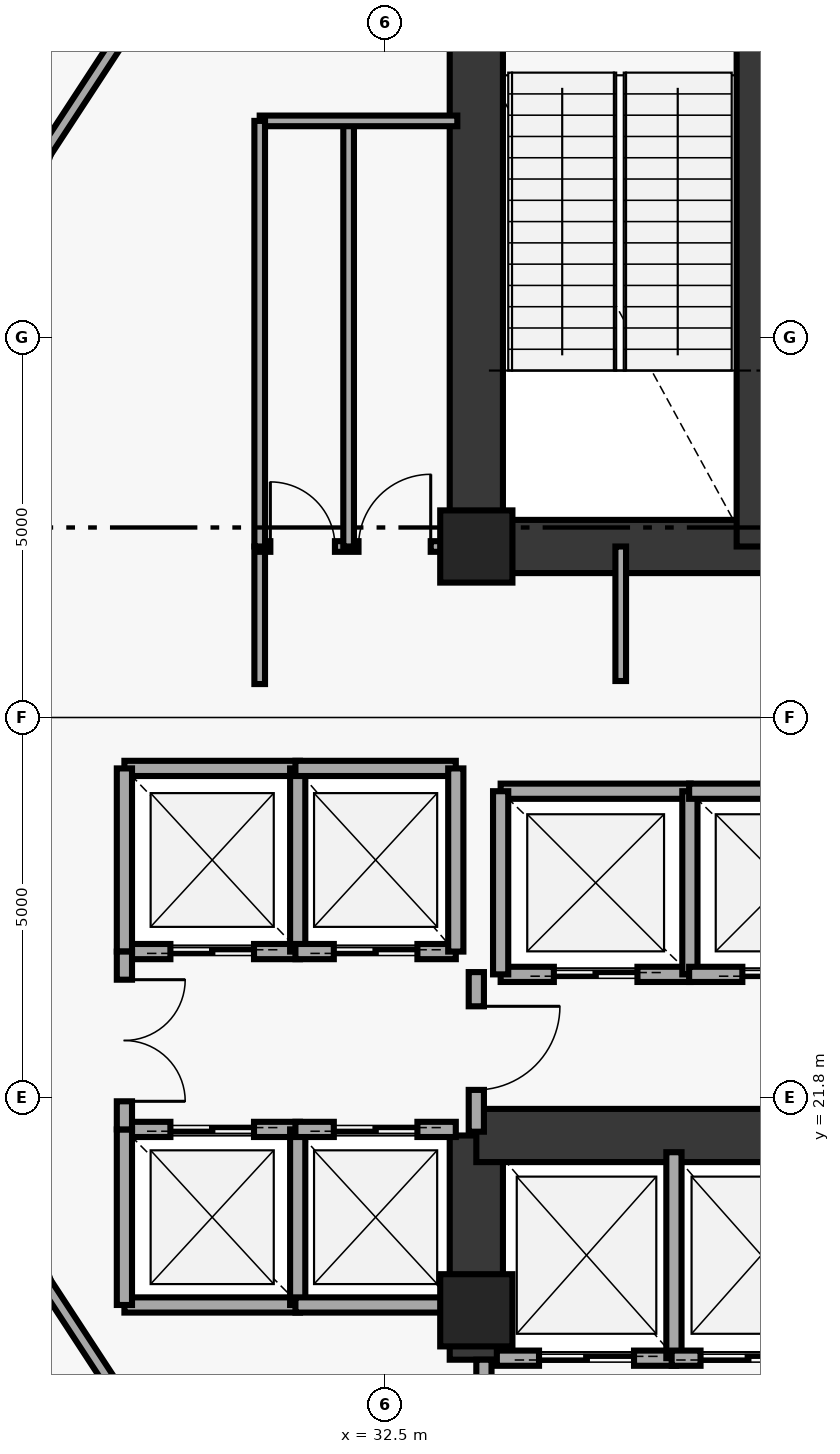
"""IFC4 building model, lengths in metres.
Left out: names, types, materials, properties, quantities, classifications, styles, units other than length and angle.
Written with IfcOpenShell. Run it as: python <this file> out.ifc"""

import sys

from ifc_helpers import new_model, si_unit, direction, frame, frame_2d, origin, origin_2d, place, context, subcontext, project, spatial, rectangle, extrude, element, fill, save


model = new_model("IFC4")
c1 = context("Model", 3, precision=1e-05, world=origin(), true_north=direction((0.0, 1.0)))
c2 = subcontext(c1, "Body", "Model", "MODEL_VIEW")
j1 = project(units=[si_unit("LENGTHUNIT", "METRE"), si_unit("PLANEANGLEUNIT", "RADIAN")], contexts=[c1])
p1 = place(None, origin())
s1 = spatial("IfcSite", under=j1, at=p1, CompositionType="ELEMENT")
p2 = place(p1, origin())
s2 = spatial("IfcBuilding", under=s1, at=p2, CompositionType="ELEMENT")
p3 = place(p2, frame((0.0, 0.0, 113.25)))
s3 = spatial("IfcBuildingStorey", under=s2, at=p3, CompositionType="ELEMENT", Elevation=113.25)
for number, where, z_axis, x_axis in (
    (1, (33.7, 19.0, 0.0), (0.0, 0.0, 1.0), (1.0, 0.0, 0.0)),
    (2, (33.7, 29.05, 0.0), (0.0, 0.0, 1.0), (1.0, 0.0, 0.0)),
):
    element("IfcColumn", number, at=place(p3, frame(where, z_axis=z_axis, x_axis=x_axis)), inside=s3, PredefinedType="PILASTER", context=c2, shape_type="SweptSolid", body=[
        extrude(rectangle(XDim=0.95, YDim=0.95, at=origin_2d()), origin(), (0.0, 0.0, 1.0), 4.75),
    ])
p4 = place(p3, frame((33.7, 29.05, 0.0), z_axis=(0.0, 0.0, 1.0), x_axis=(0.0, 1.0, 0.0)))
e3 = element("IfcWall", 3, at=p4, inside=s3, PredefinedType="SHEAR", context=c2, shape_type="SweptSolid", body=[
    extrude(rectangle(XDim=8.35, YDim=0.7, at=frame_2d((4.175, 0.0))), origin(), (0.0, 0.0, 1.0), 4.75),
])
p5 = place(p3, frame((33.7, 18.35, 0.0), z_axis=(0.0, 0.0, 1.0), x_axis=(0.0, 1.0, 0.0)))
e4 = element("IfcWall", 4, at=p5, inside=s3, PredefinedType="SHEAR", context=c2, shape_type="SweptSolid", body=[
    extrude(rectangle(XDim=2.95, YDim=0.7, at=frame_2d((1.475, 0.0))), origin(), (0.0, 0.0, 1.0), 4.75),
])
p6 = place(p3, frame((33.7, 29.05, 0.0), z_axis=(0.0, 0.0, 1.0), x_axis=(1.0, 0.0, 0.0)))
e5 = element("IfcWall", 5, at=p6, inside=s3, PredefinedType="SHEAR", context=c2, shape_type="SweptSolid", body=[
    extrude(rectangle(XDim=10.6, YDim=0.7, at=frame_2d((5.3, 0.0))), origin(), (0.0, 0.0, 1.0), 4.75),
])
p7 = place(p3, frame((33.7, 21.3, 0.0), z_axis=(0.0, 0.0, 1.0), x_axis=(1.0, 0.0, 0.0)))
e6 = element("IfcWall", 6, at=p7, inside=s3, PredefinedType="SHEAR", context=c2, shape_type="SweptSolid", body=[
    extrude(rectangle(XDim=7.55, YDim=0.7, at=frame_2d((3.775, 0.0))), origin(), (0.0, 0.0, 1.0), 4.75),
])
p8 = place(p3, frame((37.35, 29.05, 0.0), z_axis=(0.0, 0.0, 1.0), x_axis=(0.0, 1.0, 0.0)))
e7 = element("IfcWall", 7, at=p8, inside=s3, PredefinedType="SHEAR", context=c2, shape_type="SweptSolid", body=[
    extrude(rectangle(XDim=8.35, YDim=0.45, at=frame_2d((4.175, 0.0))), origin(), (0.0, 0.0, 1.0), 4.75),
])
p9 = place(p3, frame((35.6, 27.28, 0.0), z_axis=(0.0, 0.0, 1.0), x_axis=(0.0, 1.0, 0.0)))
e8 = element("IfcWall", 8, at=p9, inside=s3, PredefinedType="PARTITIONING", context=c2, shape_type="SweptSolid", body=[
    extrude(rectangle(XDim=1.77, YDim=0.14, at=frame_2d((0.885, 0.0))), origin(), (0.0, 0.0, 1.0), 4.75),
])
p10 = place(p3, frame((29.07, 23.72, 0.0), z_axis=(0.0, 0.0, 1.0), x_axis=(1.0, 0.0, 0.0)))
e9 = element("IfcWall", 9, at=p10, inside=s3, PredefinedType="SOLIDWALL", context=c2, shape_type="SweptSolid", body=[
    extrude(rectangle(XDim=2.31, YDim=0.2, at=frame_2d((1.155, 0.0))), origin(), (0.0, 0.0, 1.0), 4.75),
])
p11 = place(p10, frame((0.605, 0.0, 0.0)))
e10 = element("IfcOpeningElement", 10, at=p11, cuts=e9, PredefinedType="OPENING", context=c2, shape_type="SweptSolid", body=[
    extrude(rectangle(XDim=1.1, YDim=2.15, at=frame_2d((0.55, 1.075))), frame((0.0, 0.11, 0.0), z_axis=(0.0, -1.0, 0.0), x_axis=(1.0, 0.0, 0.0)), (0.0, 0.0, 1.0), 0.22),
])
p12 = place(p3, frame((29.07, 26.13, 0.0), z_axis=(0.0, 0.0, 1.0), x_axis=(1.0, 0.0, 0.0)))
e11 = element("IfcWall", 11, at=p12, inside=s3, PredefinedType="SOLIDWALL", context=c2, shape_type="SweptSolid", body=[
    extrude(rectangle(XDim=2.31, YDim=0.2, at=frame_2d((1.155, 0.0))), origin(), (0.0, 0.0, 1.0), 4.75),
])
for number, where, z_axis, x_axis in (
    (12, (29.07, 23.72, 0.0), (0.0, 0.0, 1.0), (0.0, 1.0, 0.0)),
    (13, (31.35, 23.72, 0.0), (0.0, 0.0, 1.0), (0.0, 1.0, 0.0)),
):
    element("IfcWall", number, at=place(p3, frame(where, z_axis=z_axis, x_axis=x_axis)), inside=s3, PredefinedType="SOLIDWALL", context=c2, shape_type="SweptSolid", body=[
        extrude(rectangle(XDim=2.41, YDim=0.2, at=frame_2d((1.205, 0.0))), origin(), (0.0, 0.0, 1.0), 4.75),
    ])
p13 = place(p3, frame((31.32, 23.72, 0.0), z_axis=(0.0, 0.0, 1.0), x_axis=(1.0, 0.0, 0.0)))
e14 = element("IfcWall", 14, at=p13, inside=s3, PredefinedType="SOLIDWALL", context=c2, shape_type="SweptSolid", body=[
    extrude(rectangle(XDim=2.11, YDim=0.2, at=frame_2d((1.055, 0.0))), origin(), (0.0, 0.0, 1.0), 4.75),
])
p14 = place(p13, frame((0.505, 0.0, 0.0)))
e15 = element("IfcOpeningElement", 15, at=p14, cuts=e14, PredefinedType="OPENING", context=c2, shape_type="SweptSolid", body=[
    extrude(rectangle(XDim=1.1, YDim=2.15, at=frame_2d((0.55, 1.075))), frame((0.0, 0.11, 0.0), z_axis=(0.0, -1.0, 0.0), x_axis=(1.0, 0.0, 0.0)), (0.0, 0.0, 1.0), 0.22),
])
p15 = place(p3, frame((31.32, 26.13, 0.0), z_axis=(0.0, 0.0, 1.0), x_axis=(1.0, 0.0, 0.0)))
e16 = element("IfcWall", 16, at=p15, inside=s3, PredefinedType="SOLIDWALL", context=c2, shape_type="SweptSolid", body=[
    extrude(rectangle(XDim=2.11, YDim=0.2, at=frame_2d((1.055, 0.0))), origin(), (0.0, 0.0, 1.0), 4.75),
])
p16 = place(p3, frame((33.43, 23.72, 0.0), z_axis=(0.0, 0.0, 1.0), x_axis=(0.0, 1.0, 0.0)))
e17 = element("IfcWall", 17, at=p16, inside=s3, PredefinedType="SOLIDWALL", context=c2, shape_type="SweptSolid", body=[
    extrude(rectangle(XDim=2.41, YDim=0.2, at=frame_2d((1.205, 0.0))), origin(), (0.0, 0.0, 1.0), 4.75),
])
p17 = place(p3, frame((29.07, 19.07, 0.0), z_axis=(0.0, 0.0, 1.0), x_axis=(1.0, 0.0, 0.0)))
e18 = element("IfcWall", 18, at=p17, inside=s3, PredefinedType="SOLIDWALL", context=c2, shape_type="SweptSolid", body=[
    extrude(rectangle(XDim=2.31, YDim=0.2, at=frame_2d((1.155, 0.0))), origin(), (0.0, 0.0, 1.0), 4.75),
])
p18 = place(p3, frame((29.07, 21.38, 0.0), z_axis=(0.0, 0.0, 1.0), x_axis=(1.0, 0.0, 0.0)))
e19 = element("IfcWall", 19, at=p18, inside=s3, PredefinedType="SOLIDWALL", context=c2, shape_type="SweptSolid", body=[
    extrude(rectangle(XDim=2.31, YDim=0.2, at=frame_2d((1.155, 0.0))), origin(), (0.0, 0.0, 1.0), 4.75),
])
p19 = place(p18, frame((0.605, 0.0, 0.0)))
e20 = element("IfcOpeningElement", 20, at=p19, cuts=e19, PredefinedType="OPENING", context=c2, shape_type="SweptSolid", body=[
    extrude(rectangle(XDim=1.1, YDim=2.15, at=frame_2d((0.55, 1.075))), frame((0.0, 0.11, 0.0), z_axis=(0.0, -1.0, 0.0), x_axis=(1.0, 0.0, 0.0)), (0.0, 0.0, 1.0), 0.22),
])
for number, where, z_axis, x_axis in (
    (21, (29.07, 19.07, 0.0), (0.0, 0.0, 1.0), (0.0, 1.0, 0.0)),
    (22, (31.35, 19.07, 0.0), (0.0, 0.0, 1.0), (0.0, 1.0, 0.0)),
):
    element("IfcWall", number, at=place(p3, frame(where, z_axis=z_axis, x_axis=x_axis)), inside=s3, PredefinedType="SOLIDWALL", context=c2, shape_type="SweptSolid", body=[
        extrude(rectangle(XDim=2.31, YDim=0.2, at=frame_2d((1.155, 0.0))), origin(), (0.0, 0.0, 1.0), 4.75),
    ])
p20 = place(p3, frame((31.32, 19.07, 0.0), z_axis=(0.0, 0.0, 1.0), x_axis=(1.0, 0.0, 0.0)))
e23 = element("IfcWall", 23, at=p20, inside=s3, PredefinedType="SOLIDWALL", context=c2, shape_type="SweptSolid", body=[
    extrude(rectangle(XDim=2.11, YDim=0.2, at=frame_2d((1.055, 0.0))), origin(), (0.0, 0.0, 1.0), 4.75),
])
p21 = place(p3, frame((31.32, 21.38, 0.0), z_axis=(0.0, 0.0, 1.0), x_axis=(1.0, 0.0, 0.0)))
e24 = element("IfcWall", 24, at=p21, inside=s3, PredefinedType="SOLIDWALL", context=c2, shape_type="SweptSolid", body=[
    extrude(rectangle(XDim=2.11, YDim=0.2, at=frame_2d((1.055, 0.0))), origin(), (0.0, 0.0, 1.0), 4.75),
])
p22 = place(p21, frame((0.505, 0.0, 0.0)))
e25 = element("IfcOpeningElement", 25, at=p22, cuts=e24, PredefinedType="OPENING", context=c2, shape_type="SweptSolid", body=[
    extrude(rectangle(XDim=1.1, YDim=2.15, at=frame_2d((0.55, 1.075))), frame((0.0, 0.11, 0.0), z_axis=(0.0, -1.0, 0.0), x_axis=(1.0, 0.0, 0.0)), (0.0, 0.0, 1.0), 0.22),
])
p23 = place(p3, frame((34.02, 23.42, 0.0), z_axis=(0.0, 0.0, 1.0), x_axis=(1.0, 0.0, 0.0)))
e26 = element("IfcWall", 26, at=p23, inside=s3, PredefinedType="SOLIDWALL", context=c2, shape_type="SweptSolid", body=[
    extrude(rectangle(XDim=2.5, YDim=0.2, at=frame_2d((1.25, 0.0))), origin(), (0.0, 0.0, 1.0), 4.75),
])
p24 = place(p23, frame((0.7, 0.0, 0.0)))
e27 = element("IfcOpeningElement", 27, at=p24, cuts=e26, PredefinedType="OPENING", context=c2, shape_type="SweptSolid", body=[
    extrude(rectangle(XDim=1.1, YDim=2.15, at=frame_2d((0.55, 1.075))), frame((0.0, 0.11, 0.0), z_axis=(0.0, -1.0, 0.0), x_axis=(1.0, 0.0, 0.0)), (0.0, 0.0, 1.0), 0.22),
])
p25 = place(p3, frame((34.02, 25.83, 0.0), z_axis=(0.0, 0.0, 1.0), x_axis=(1.0, 0.0, 0.0)))
e28 = element("IfcWall", 28, at=p25, inside=s3, PredefinedType="SOLIDWALL", context=c2, shape_type="SweptSolid", body=[
    extrude(rectangle(XDim=2.5, YDim=0.2, at=frame_2d((1.25, 0.0))), origin(), (0.0, 0.0, 1.0), 4.75),
])
for number, where, z_axis, x_axis in (
    (29, (34.02, 23.42, 0.0), (0.0, 0.0, 1.0), (0.0, 1.0, 0.0)),
    (30, (36.51, 23.42, 0.0), (0.0, 0.0, 1.0), (0.0, 1.0, 0.0)),
):
    element("IfcWall", number, at=place(p3, frame(where, z_axis=z_axis, x_axis=x_axis)), inside=s3, PredefinedType="SOLIDWALL", context=c2, shape_type="SweptSolid", body=[
        extrude(rectangle(XDim=2.41, YDim=0.2, at=frame_2d((1.205, 0.0))), origin(), (0.0, 0.0, 1.0), 4.75),
    ])
p26 = place(p3, frame((36.5, 23.42, 0.0), z_axis=(0.0, 0.0, 1.0), x_axis=(1.0, 0.0, 0.0)))
e31 = element("IfcWall", 31, at=p26, inside=s3, PredefinedType="SOLIDWALL", context=c2, shape_type="SweptSolid", body=[
    extrude(rectangle(XDim=2.5, YDim=0.2, at=frame_2d((1.25, 0.0))), origin(), (0.0, 0.0, 1.0), 4.75),
])
p27 = place(p26, frame((0.7, 0.0, 0.0)))
e32 = element("IfcOpeningElement", 32, at=p27, cuts=e31, PredefinedType="OPENING", context=c2, shape_type="SweptSolid", body=[
    extrude(rectangle(XDim=1.1, YDim=2.15, at=frame_2d((0.55, 1.075))), frame((0.0, 0.11, 0.0), z_axis=(0.0, -1.0, 0.0), x_axis=(1.0, 0.0, 0.0)), (0.0, 0.0, 1.0), 0.22),
])
p28 = place(p3, frame((36.5, 25.83, 0.0), z_axis=(0.0, 0.0, 1.0), x_axis=(1.0, 0.0, 0.0)))
e33 = element("IfcWall", 33, at=p28, inside=s3, PredefinedType="SOLIDWALL", context=c2, shape_type="SweptSolid", body=[
    extrude(rectangle(XDim=2.5, YDim=0.2, at=frame_2d((1.25, 0.0))), origin(), (0.0, 0.0, 1.0), 4.75),
])
p29 = place(p3, frame((33.97, 18.37, 0.0), z_axis=(0.0, 0.0, 1.0), x_axis=(1.0, 0.0, 0.0)))
e34 = element("IfcWall", 34, at=p29, inside=s3, PredefinedType="SOLIDWALL", context=c2, shape_type="SweptSolid", body=[
    extrude(rectangle(XDim=2.36, YDim=0.2, at=frame_2d((1.18, 0.0))), origin(), (0.0, 0.0, 1.0), 4.75),
])
p30 = place(p29, frame((0.555, 0.0, 0.0)))
e35 = element("IfcOpeningElement", 35, at=p30, cuts=e34, PredefinedType="OPENING", context=c2, shape_type="SweptSolid", body=[
    extrude(rectangle(XDim=1.25, YDim=2.2, at=frame_2d((0.625, 1.1))), frame((0.0, 0.11, 0.0), z_axis=(0.0, -1.0, 0.0), x_axis=(1.0, 0.0, 0.0)), (0.0, 0.0, 1.0), 0.22),
])
p31 = place(p3, frame((36.3, 18.37, 0.0), z_axis=(0.0, 0.0, 1.0), x_axis=(0.0, 1.0, 0.0)))
e36 = element("IfcWall", 36, at=p31, inside=s3, PredefinedType="SOLIDWALL", context=c2, shape_type="SweptSolid", body=[
    extrude(rectangle(XDim=2.71, YDim=0.2, at=frame_2d((1.355, 0.0))), origin(), (0.0, 0.0, 1.0), 4.75),
])
p32 = place(p3, frame((36.27, 18.37, 0.0), z_axis=(0.0, 0.0, 1.0), x_axis=(1.0, 0.0, 0.0)))
e37 = element("IfcWall", 37, at=p32, inside=s3, PredefinedType="SOLIDWALL", context=c2, shape_type="SweptSolid", body=[
    extrude(rectangle(XDim=2.36, YDim=0.2, at=frame_2d((1.18, 0.0))), origin(), (0.0, 0.0, 1.0), 4.75),
])
p33 = place(p32, frame((0.38, 0.0, 0.0)))
e38 = element("IfcOpeningElement", 38, at=p33, cuts=e37, PredefinedType="OPENING", context=c2, shape_type="SweptSolid", body=[
    extrude(rectangle(XDim=1.25, YDim=2.2, at=frame_2d((0.625, 1.1))), frame((0.0, 0.11, 0.0), z_axis=(0.0, -1.0, 0.0), x_axis=(1.0, 0.0, 0.0)), (0.0, 0.0, 1.0), 0.22),
])
p34 = place(p3, frame((29.07, 21.38, 0.0), z_axis=(0.0, 0.0, 1.0), x_axis=(0.0, 1.0, 0.0)))
e39 = element("IfcWall", 39, at=p34, inside=s3, PredefinedType="SOLIDWALL", context=c2, shape_type="SweptSolid", body=[
    extrude(rectangle(XDim=2.34, YDim=0.2, at=frame_2d((1.17, 0.0))), origin(), (0.0, 0.0, 1.0), 4.75),
])
p35 = place(p34, frame((0.37, 0.0, 0.0)))
e40 = element("IfcOpeningElement", 40, at=p35, cuts=e39, PredefinedType="OPENING", context=c2, shape_type="SweptSolid", body=[
    extrude(rectangle(XDim=1.6, YDim=2.2, at=frame_2d((0.8, 1.1))), frame((0.0, 0.11, 0.0), z_axis=(0.0, -1.0, 0.0), x_axis=(1.0, 0.0, 0.0)), (0.0, 0.0, 1.0), 0.22),
])
p36 = place(p3, frame((33.7, 21.35, 0.0), z_axis=(0.0, 0.0, 1.0), x_axis=(0.0, 1.0, 0.0)))
e41 = element("IfcWall", 41, at=p36, inside=s3, PredefinedType="SOLIDWALL", context=c2, shape_type="SweptSolid", body=[
    extrude(rectangle(XDim=2.1, YDim=0.2, at=frame_2d((1.05, 0.0))), origin(), (0.0, 0.0, 1.0), 4.135),
])
p37 = place(p36, frame((0.55, 0.0, 0.0)))
e42 = element("IfcOpeningElement", 42, at=p37, cuts=e41, PredefinedType="OPENING", context=c2, shape_type="SweptSolid", body=[
    extrude(rectangle(XDim=1.1, YDim=2.15, at=frame_2d((0.55, 1.075))), frame((0.0, 0.11, 0.0), z_axis=(0.0, -1.0, 0.0), x_axis=(1.0, 0.0, 0.0)), (0.0, 0.0, 1.0), 0.22),
])
p38 = place(p3, frame((33.8, 15.55, 0.0), z_axis=(0.0, 0.0, 1.0), x_axis=(0.0, 1.0, 0.0)))
e43 = element("IfcWall", 43, at=p38, inside=s3, PredefinedType="SOLIDWALL", context=c2, shape_type="SweptSolid", body=[
    extrude(rectangle(XDim=2.8, YDim=0.2, at=frame_2d((1.4, 0.0))), origin(), (0.0, 0.0, 1.0), 4.75),
])
p39 = place(p3, frame((30.85, 27.24, 0.0), z_axis=(0.0, 0.0, 1.0), x_axis=(0.0, 1.0, 0.0)))
e44 = element("IfcWall", 44, at=p39, inside=s3, PredefinedType="PARTITIONING", context=c2, shape_type="SweptSolid", body=[
    extrude(rectangle(XDim=1.81, YDim=0.14, at=frame_2d((0.905, 0.0))), origin(), (0.0, 0.0, 1.0), 4.75),
])
p40 = place(p3, frame((30.85, 29.05, 0.0), z_axis=(0.0, 0.0, 1.0), x_axis=(1.0, 0.0, 0.0)))
e45 = element("IfcWall", 45, at=p40, inside=s3, PredefinedType="PARTITIONING", context=c2, shape_type="SweptSolid", body=[
    extrude(rectangle(XDim=2.43, YDim=0.14, at=frame_2d((1.215, 0.0))), origin(), (0.0, 0.0, 1.0), 3.74),
])
p41 = place(p40, frame((0.14, 0.0, 0.0)))
e46 = element("IfcOpeningElement", 46, at=p41, cuts=e45, PredefinedType="OPENING", context=c2, shape_type="SweptSolid", body=[
    extrude(rectangle(XDim=0.85, YDim=2.1, at=frame_2d((0.425, 1.05))), frame((0.0, 0.08, 0.0), z_axis=(0.0, -1.0, 0.0), x_axis=(1.0, 0.0, 0.0)), (0.0, 0.0, 1.0), 0.16),
])
p42 = place(p40, frame((1.3, 0.0, 0.0)))
e47 = element("IfcOpeningElement", 47, at=p42, cuts=e45, PredefinedType="OPENING", context=c2, shape_type="SweptSolid", body=[
    extrude(rectangle(XDim=0.95, YDim=2.1, at=frame_2d((0.475, 1.05))), frame((0.0, 0.08, 0.0), z_axis=(0.0, -1.0, 0.0), x_axis=(1.0, 0.0, 0.0)), (0.0, 0.0, 1.0), 0.16),
])
p43 = place(p3, frame((32.02, 29.05, 0.0), z_axis=(0.0, 0.0, 1.0), x_axis=(0.0, 1.0, 0.0)))
e48 = element("IfcWall", 48, at=p43, inside=s3, PredefinedType="PARTITIONING", context=c2, shape_type="SweptSolid", body=[
    extrude(rectangle(XDim=5.6, YDim=0.14, at=frame_2d((2.8, 0.0))), origin(), (0.0, 0.0, 1.0), 4.75),
])
p44 = place(p3, frame((30.85, 34.65, 0.0), z_axis=(0.0, 0.0, 1.0), x_axis=(1.0, 0.0, 0.0)))
e49 = element("IfcWall", 49, at=p44, inside=s3, PredefinedType="PARTITIONING", context=c2, shape_type="SweptSolid", body=[
    extrude(rectangle(XDim=2.6, YDim=0.14, at=frame_2d((1.3, 0.0))), origin(), (0.0, 0.0, 1.0), 4.75),
])
p45 = place(p3, frame((30.85, 29.05, 0.0), z_axis=(0.0, 0.0, 1.0), x_axis=(0.0, 1.0, 0.0)))
e50 = element("IfcWall", 50, at=p45, inside=s3, PredefinedType="PARTITIONING", context=c2, shape_type="SweptSolid", body=[
    extrude(rectangle(XDim=5.6, YDim=0.14, at=frame_2d((2.8, 0.0))), origin(), (0.0, 0.0, 1.0), 4.75),
])
for number, where, z_axis, x_axis in (
    (51, (30.041, 37.315, 0.0), (0.0, 0.0, 1.0), (-0.547, -0.837, 0.0)),
    (52, (28.027, 19.365, 0.0), (0.0, 0.0, 1.0), (0.547, -0.837, 0.0)),
):
    element("IfcWall", number, at=place(p3, frame(where, z_axis=z_axis, x_axis=x_axis)), inside=s3, PredefinedType="PARTITIONING", context=c2, shape_type="SweptSolid", body=[
        extrude(rectangle(XDim=3.68, YDim=0.16, at=frame_2d((1.84, 0.0))), origin(), (0.0, 0.0, 1.0), 4.75),
    ])
p46 = place(p11, origin())
e53 = element("IfcDoor", 53, at=p46, inside=s3, OperationType="DOUBLE_DOOR_SLIDING", PredefinedType="DOOR", context=c2, shape_type="SweptSolid", body=[
    extrude(rectangle(XDim=1.1, YDim=2.15, at=frame_2d((0.55, 1.075))), frame((0.0, 0.025, 0.0), z_axis=(0.0, -1.0, 0.0), x_axis=(1.0, 0.0, 0.0)), (0.0, 0.0, 1.0), 0.05),
])
fill(e10, e53)
p47 = place(p14, origin())
e54 = element("IfcDoor", 54, at=p47, inside=s3, OperationType="DOUBLE_DOOR_SLIDING", PredefinedType="DOOR", context=c2, shape_type="SweptSolid", body=[
    extrude(rectangle(XDim=1.1, YDim=2.15, at=frame_2d((0.55, 1.075))), frame((0.0, 0.025, 0.0), z_axis=(0.0, -1.0, 0.0), x_axis=(1.0, 0.0, 0.0)), (0.0, 0.0, 1.0), 0.05),
])
fill(e15, e54)
p48 = place(p19, origin())
e55 = element("IfcDoor", 55, at=p48, inside=s3, OperationType="DOUBLE_DOOR_SLIDING", PredefinedType="DOOR", context=c2, shape_type="SweptSolid", body=[
    extrude(rectangle(XDim=1.1, YDim=2.15, at=frame_2d((0.55, 1.075))), frame((0.0, 0.025, 0.0), z_axis=(0.0, -1.0, 0.0), x_axis=(1.0, 0.0, 0.0)), (0.0, 0.0, 1.0), 0.05),
])
fill(e20, e55)
p49 = place(p22, origin())
e56 = element("IfcDoor", 56, at=p49, inside=s3, OperationType="DOUBLE_DOOR_SLIDING", PredefinedType="DOOR", context=c2, shape_type="SweptSolid", body=[
    extrude(rectangle(XDim=1.1, YDim=2.15, at=frame_2d((0.55, 1.075))), frame((0.0, 0.025, 0.0), z_axis=(0.0, -1.0, 0.0), x_axis=(1.0, 0.0, 0.0)), (0.0, 0.0, 1.0), 0.05),
])
fill(e25, e56)
p50 = place(p24, origin())
e57 = element("IfcDoor", 57, at=p50, inside=s3, OperationType="DOUBLE_DOOR_SLIDING", PredefinedType="DOOR", context=c2, shape_type="SweptSolid", body=[
    extrude(rectangle(XDim=1.1, YDim=2.15, at=frame_2d((0.55, 1.075))), frame((0.0, 0.025, 0.0), z_axis=(0.0, -1.0, 0.0), x_axis=(1.0, 0.0, 0.0)), (0.0, 0.0, 1.0), 0.05),
])
fill(e27, e57)
p51 = place(p27, origin())
e58 = element("IfcDoor", 58, at=p51, inside=s3, OperationType="DOUBLE_DOOR_SLIDING", PredefinedType="DOOR", context=c2, shape_type="SweptSolid", body=[
    extrude(rectangle(XDim=1.1, YDim=2.15, at=frame_2d((0.55, 1.075))), frame((0.0, 0.025, 0.0), z_axis=(0.0, -1.0, 0.0), x_axis=(1.0, 0.0, 0.0)), (0.0, 0.0, 1.0), 0.05),
])
fill(e32, e58)
p52 = place(p30, origin())
e59 = element("IfcDoor", 59, at=p52, inside=s3, OperationType="DOUBLE_DOOR_SLIDING", PredefinedType="DOOR", context=c2, shape_type="SweptSolid", body=[
    extrude(rectangle(XDim=1.25, YDim=2.2, at=frame_2d((0.625, 1.1))), frame((0.0, 0.025, 0.0), z_axis=(0.0, -1.0, 0.0), x_axis=(1.0, 0.0, 0.0)), (0.0, 0.0, 1.0), 0.05),
])
fill(e35, e59)
p53 = place(p33, origin())
e60 = element("IfcDoor", 60, at=p53, inside=s3, OperationType="DOUBLE_DOOR_SLIDING", PredefinedType="DOOR", context=c2, shape_type="SweptSolid", body=[
    extrude(rectangle(XDim=1.25, YDim=2.2, at=frame_2d((0.625, 1.1))), frame((0.0, 0.025, 0.0), z_axis=(0.0, -1.0, 0.0), x_axis=(1.0, 0.0, 0.0)), (0.0, 0.0, 1.0), 0.05),
])
fill(e38, e60)
p54 = place(p35, origin())
e61 = element("IfcDoor", 61, at=p54, inside=s3, OperationType="DOUBLE_DOOR_SINGLE_SWING", PredefinedType="DOOR", context=c2, shape_type="SweptSolid", body=[
    extrude(rectangle(XDim=1.6, YDim=2.2, at=frame_2d((0.8, 1.1))), frame((0.0, 0.025, 0.0), z_axis=(0.0, -1.0, 0.0), x_axis=(1.0, 0.0, 0.0)), (0.0, 0.0, 1.0), 0.05),
])
fill(e40, e61)
p55 = place(p37, origin())
e62 = element("IfcDoor", 62, at=p55, inside=s3, OperationType="SINGLE_SWING_RIGHT", PredefinedType="DOOR", context=c2, shape_type="SweptSolid", body=[
    extrude(rectangle(XDim=1.1, YDim=2.15, at=frame_2d((0.55, 1.075))), frame((0.0, 0.025, 0.0), z_axis=(0.0, -1.0, 0.0), x_axis=(1.0, 0.0, 0.0)), (0.0, 0.0, 1.0), 0.05),
])
fill(e42, e62)
p56 = place(p41, origin())
e63 = element("IfcDoor", 63, at=p56, inside=s3, OperationType="SINGLE_SWING_LEFT", PredefinedType="DOOR", context=c2, shape_type="SweptSolid", body=[
    extrude(rectangle(XDim=0.85, YDim=2.1, at=frame_2d((0.425, 1.05))), frame((0.0, 0.025, 0.0), z_axis=(0.0, -1.0, 0.0), x_axis=(1.0, 0.0, 0.0)), (0.0, 0.0, 1.0), 0.05),
])
fill(e46, e63)
p57 = place(p42, origin())
e64 = element("IfcDoor", 64, at=p57, inside=s3, OperationType="SINGLE_SWING_RIGHT", PredefinedType="DOOR", context=c2, shape_type="SweptSolid", body=[
    extrude(rectangle(XDim=0.95, YDim=2.1, at=frame_2d((0.475, 1.05))), frame((0.0, 0.025, 0.0), z_axis=(0.0, -1.0, 0.0), x_axis=(1.0, 0.0, 0.0)), (0.0, 0.0, 1.0), 0.05),
])
fill(e47, e64)
save(model, sys.argv[1])
